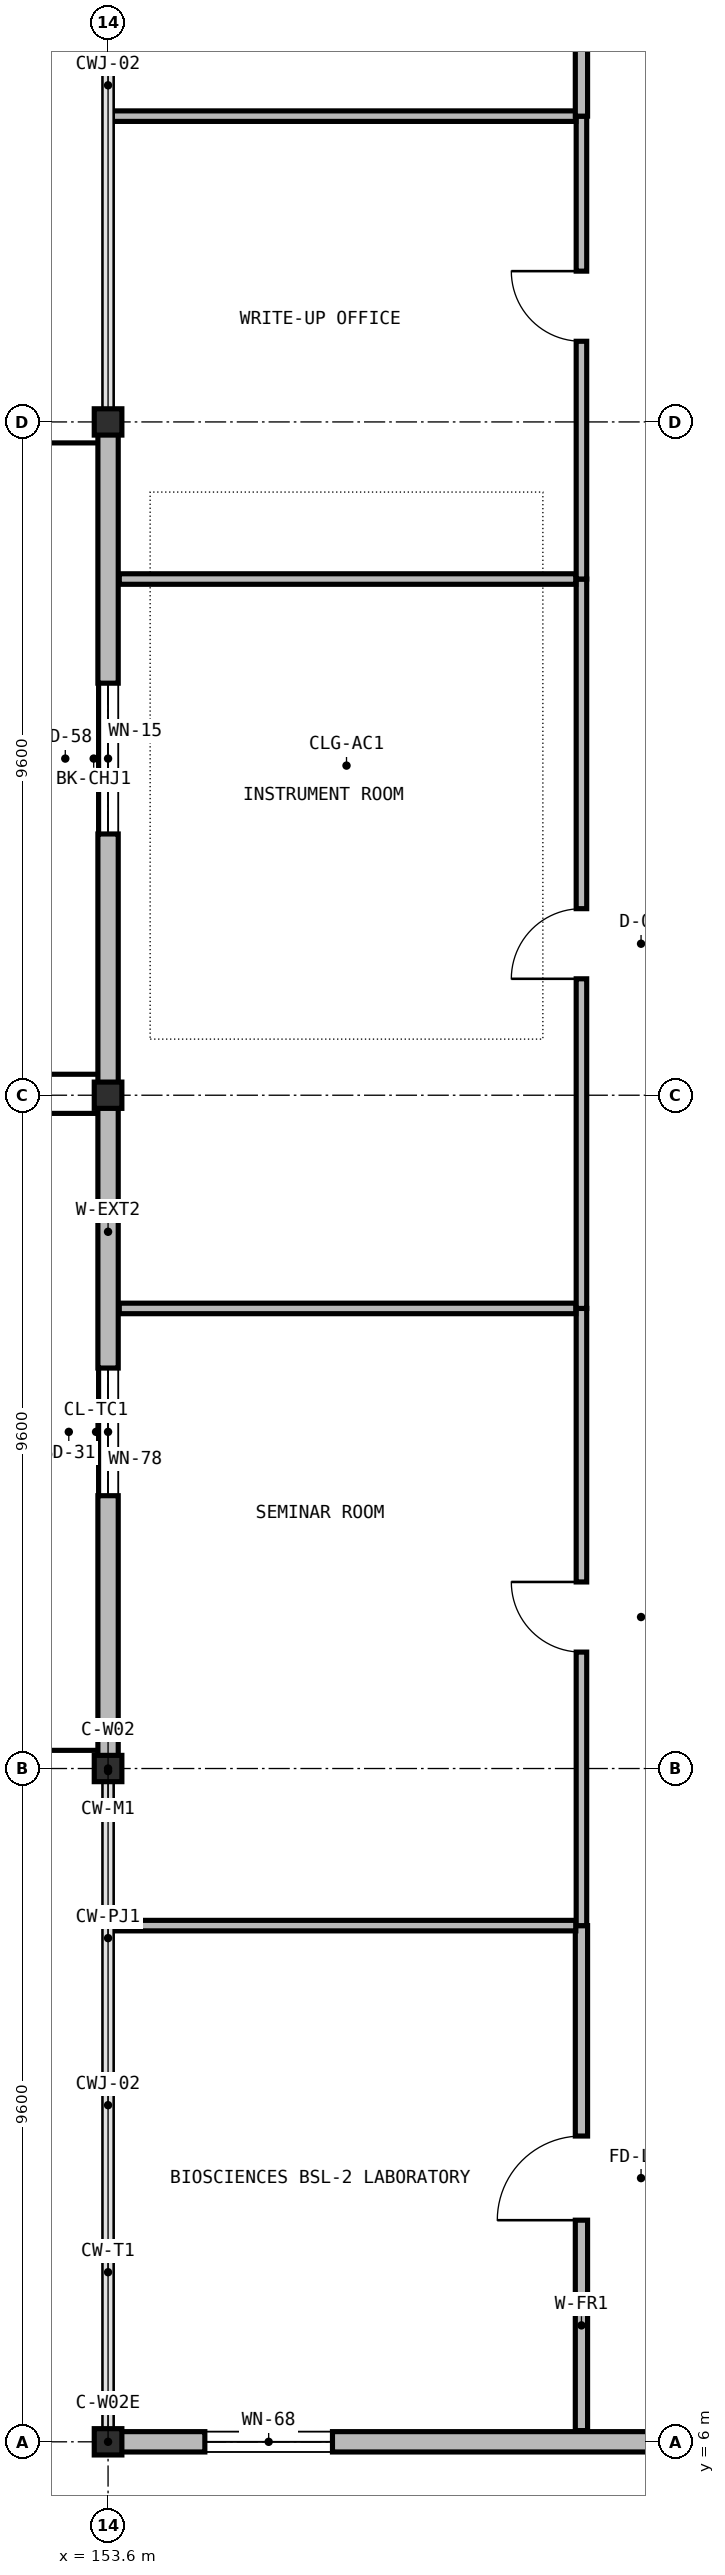
"""IFC4 building model, lengths in metres.
Left out: names, types, materials, properties, quantities, classifications, styles, units other than length and angle.
Written with IfcOpenShell. Run it as: python <this file> out.ifc"""

import sys

from ifc_helpers import new_model, si_unit, direction, frame, frame_2d, origin, origin_2d, place, context, subcontext, project, spatial, rectangle, i_section, extrude, element, fill, save


model = new_model("IFC4")
c1 = context("Model", 3, precision=1e-05, world=origin(), true_north=direction((0.0, 1.0)))
c2 = subcontext(c1, "Body", "Model", "MODEL_VIEW")
j1 = project(units=[si_unit("LENGTHUNIT", "METRE"), si_unit("PLANEANGLEUNIT", "RADIAN")], contexts=[c1])
p1 = place(None, origin())
s1 = spatial("IfcSite", under=j1, at=p1, CompositionType="ELEMENT")
p2 = place(p1, origin())
s2 = spatial("IfcBuilding", under=s1, at=p2, CompositionType="ELEMENT")
p3 = place(p2, frame((0.0, 0.0, 14.35)))
s3 = spatial("IfcBuildingStorey", under=s2, at=p3, CompositionType="ELEMENT", Elevation=14.35)
for number, where, z_axis, x_axis in (
    (1, (153.6, 6.0, 0.0), (0.0, 0.0, 1.0), (1.0, 0.0, 0.0)),
    (2, (153.6, 15.6, 0.0), (0.0, 0.0, 1.0), (1.0, 0.0, 0.0)),
    (3, (153.6, 25.2, 0.0), (0.0, 0.0, 1.0), (1.0, 0.0, 0.0)),
    (4, (153.6, 34.8, 0.0), (0.0, 0.0, 1.0), (1.0, 0.0, 0.0)),
):
    element("IfcColumn", number, at=place(p3, frame(where, z_axis=z_axis, x_axis=x_axis)), inside=s3, PredefinedType="COLUMN", context=c2, shape_type="SweptSolid", body=[
        extrude(i_section(OverallWidth=0.394, OverallDepth=0.375, WebThickness=0.02, FlangeThickness=0.032, at=origin_2d()), origin(), (0.0, 0.0, 1.0), 4.55),
    ])
p4 = place(p3, frame((153.6, 15.604, 0.0), z_axis=(0.0, 0.0, 1.0), x_axis=(0.0, 1.0, 0.0)))
e5 = element("IfcWall", 5, at=p4, inside=s3, PredefinedType="SOLIDWALL", context=c2, shape_type="SweptSolid", body=[
    extrude(rectangle(XDim=9.592, YDim=0.29, at=frame_2d((4.796, 0.0))), origin(), (0.0, 0.0, 1.0), 3.892),
])
p5 = place(p4, frame((3.886, 0.0, 0.95)))
e6 = element("IfcOpeningElement", 6, at=p5, cuts=e5, PredefinedType="OPENING", context=c2, shape_type="SweptSolid", body=[
    extrude(rectangle(XDim=1.82, YDim=1.56, at=frame_2d((0.91, 0.78))), frame((0.0, 0.155, 0.0), z_axis=(0.0, -1.0, 0.0), x_axis=(1.0, 0.0, 0.0)), (0.0, 0.0, 1.0), 0.31),
])
p6 = place(p3, frame((153.6, 25.204, 0.0), z_axis=(0.0, 0.0, 1.0), x_axis=(0.0, 1.0, 0.0)))
e7 = element("IfcWall", 7, at=p6, inside=s3, PredefinedType="SOLIDWALL", context=c2, shape_type="SweptSolid", body=[
    extrude(rectangle(XDim=9.592, YDim=0.29, at=frame_2d((4.796, 0.0))), origin(), (0.0, 0.0, 1.0), 3.892),
])
p7 = place(p6, frame((3.721, 0.0, 0.95)))
e8 = element("IfcOpeningElement", 8, at=p7, cuts=e7, PredefinedType="OPENING", context=c2, shape_type="SweptSolid", body=[
    extrude(rectangle(XDim=2.15, YDim=1.48, at=frame_2d((1.075, 0.74))), frame((0.0, 0.155, 0.0), z_axis=(0.0, -1.0, 0.0), x_axis=(1.0, 0.0, 0.0)), (0.0, 0.0, 1.0), 0.31),
])
p8 = place(p3, frame((163.196, 6.0, 0.0), z_axis=(0.0, 0.0, 1.0), x_axis=(-1.0, 0.0, 0.0)))
e9 = element("IfcWall", 9, at=p8, inside=s3, PredefinedType="SOLIDWALL", context=c2, shape_type="SweptSolid", body=[
    extrude(rectangle(XDim=9.741, YDim=0.29, at=frame_2d((4.871, 0.0))), origin(), (0.0, 0.0, 1.0), 3.884),
])
p9 = place(p8, frame((6.396, 0.0, 0.95)))
e10 = element("IfcOpeningElement", 10, at=p9, cuts=e9, PredefinedType="OPENING", context=c2, shape_type="SweptSolid", body=[
    extrude(rectangle(XDim=1.82, YDim=1.72, at=frame_2d((0.91, 0.86))), frame((0.0, 0.155, 0.0), z_axis=(0.0, -1.0, 0.0), x_axis=(1.0, 0.0, 0.0)), (0.0, 0.0, 1.0), 0.31),
])
p10 = place(p3, frame((160.35, 6.16, 0.0), z_axis=(0.0, 0.0, 1.0), x_axis=(0.0, 1.0, 0.0)))
e11 = element("IfcWall", 11, at=p10, inside=s3, PredefinedType="PARTITIONING", context=c2, shape_type="SweptSolid", body=[
    extrude(rectangle(XDim=7.2, YDim=0.175, at=frame_2d((3.6, 0.0))), origin(), (0.0, 0.0, 1.0), 4.3),
])
p11 = place(p10, frame((3.0, 0.0, 0.0)))
e12 = element("IfcOpeningElement", 12, at=p11, cuts=e11, PredefinedType="OPENING", context=c2, shape_type="SweptSolid", body=[
    extrude(rectangle(XDim=1.2, YDim=2.2, at=frame_2d((0.6, 1.1))), frame((0.0, 0.097, 0.0), z_axis=(0.0, -1.0, 0.0), x_axis=(1.0, 0.0, 0.0)), (0.0, 0.0, 1.0), 0.195),
])
p12 = place(p3, frame((153.66, 13.36, 0.0), z_axis=(0.0, 0.0, 1.0), x_axis=(1.0, 0.0, 0.0)))
e13 = element("IfcWall", 13, at=p12, inside=s3, PredefinedType="PARTITIONING", context=c2, shape_type="SweptSolid", body=[
    extrude(rectangle(XDim=6.61, YDim=0.15, at=frame_2d((3.305, 0.0))), origin(), (0.0, 0.0, 1.0), 4.3),
])
p13 = place(p3, frame((160.35, 13.36, 0.0), z_axis=(0.0, 0.0, 1.0), x_axis=(0.0, 1.0, 0.0)))
e14 = element("IfcWall", 14, at=p13, inside=s3, PredefinedType="PARTITIONING", context=c2, shape_type="SweptSolid", body=[
    extrude(rectangle(XDim=8.8, YDim=0.15, at=frame_2d((4.4, 0.0))), origin(), (0.0, 0.0, 1.0), 4.3),
])
p14 = place(p13, frame((3.9, 0.0, 0.0)))
e15 = element("IfcOpeningElement", 15, at=p14, cuts=e14, PredefinedType="OPENING", context=c2, shape_type="SweptSolid", body=[
    extrude(rectangle(XDim=1.0, YDim=2.2, at=frame_2d((0.5, 1.1))), frame((0.0, 0.085, 0.0), z_axis=(0.0, -1.0, 0.0), x_axis=(1.0, 0.0, 0.0)), (0.0, 0.0, 1.0), 0.17),
])
p15 = place(p3, frame((153.76, 22.16, 0.0), z_axis=(0.0, 0.0, 1.0), x_axis=(1.0, 0.0, 0.0)))
e16 = element("IfcWall", 16, at=p15, inside=s3, PredefinedType="PARTITIONING", context=c2, shape_type="SweptSolid", body=[
    extrude(rectangle(XDim=6.51, YDim=0.15, at=frame_2d((3.255, 0.0))), origin(), (0.0, 0.0, 1.0), 4.3),
])
p16 = place(p3, frame((160.35, 22.16, 0.0), z_axis=(0.0, 0.0, 1.0), x_axis=(0.0, 1.0, 0.0)))
e17 = element("IfcWall", 17, at=p16, inside=s3, PredefinedType="PARTITIONING", context=c2, shape_type="SweptSolid", body=[
    extrude(rectangle(XDim=10.4, YDim=0.15, at=frame_2d((5.2, 0.0))), origin(), (0.0, 0.0, 1.0), 4.3),
])
p17 = place(p16, frame((4.7, 0.0, 0.0)))
e18 = element("IfcOpeningElement", 18, at=p17, cuts=e17, PredefinedType="OPENING", context=c2, shape_type="SweptSolid", body=[
    extrude(rectangle(XDim=1.0, YDim=2.2, at=frame_2d((0.5, 1.1))), frame((0.0, 0.085, 0.0), z_axis=(0.0, -1.0, 0.0), x_axis=(1.0, 0.0, 0.0)), (0.0, 0.0, 1.0), 0.17),
])
p18 = place(p3, frame((153.76, 32.56, 0.0), z_axis=(0.0, 0.0, 1.0), x_axis=(1.0, 0.0, 0.0)))
e19 = element("IfcWall", 19, at=p18, inside=s3, PredefinedType="PARTITIONING", context=c2, shape_type="SweptSolid", body=[
    extrude(rectangle(XDim=6.51, YDim=0.15, at=frame_2d((3.255, 0.0))), origin(), (0.0, 0.0, 1.0), 4.3),
])
p19 = place(p3, frame((160.35, 32.56, 0.0), z_axis=(0.0, 0.0, 1.0), x_axis=(0.0, 1.0, 0.0)))
e20 = element("IfcWall", 20, at=p19, inside=s3, PredefinedType="PARTITIONING", context=c2, shape_type="SweptSolid", body=[
    extrude(rectangle(XDim=6.6, YDim=0.15, at=frame_2d((3.3, 0.0))), origin(), (0.0, 0.0, 1.0), 4.3),
])
p20 = place(p19, frame((3.39, 0.0, 0.0)))
e21 = element("IfcOpeningElement", 21, at=p20, cuts=e20, PredefinedType="OPENING", context=c2, shape_type="SweptSolid", body=[
    extrude(rectangle(XDim=1.0, YDim=2.2, at=frame_2d((0.5, 1.1))), frame((0.0, 0.085, 0.0), z_axis=(0.0, -1.0, 0.0), x_axis=(1.0, 0.0, 0.0)), (0.0, 0.0, 1.0), 0.17),
])
p21 = place(p3, frame((153.66, 39.16, 0.0), z_axis=(0.0, 0.0, 1.0), x_axis=(1.0, 0.0, 0.0)))
e22 = element("IfcWall", 22, at=p21, inside=s3, PredefinedType="PARTITIONING", context=c2, shape_type="SweptSolid", body=[
    extrude(rectangle(XDim=6.61, YDim=0.15, at=frame_2d((3.305, 0.0))), origin(), (0.0, 0.0, 1.0), 4.3),
])
p22 = place(p3, frame((160.35, 39.16, 0.0), z_axis=(0.0, 0.0, 1.0), x_axis=(0.0, 1.0, 0.0)))
e23 = element("IfcWall", 23, at=p22, inside=s3, PredefinedType="PARTITIONING", context=c2, shape_type="SweptSolid", body=[
    extrude(rectangle(XDim=7.2, YDim=0.175, at=frame_2d((3.6, 0.0))), origin(), (0.0, 0.0, 1.0), 4.3),
])
p23 = place(p22, frame((3.0, 0.0, 0.0)))
e24 = element("IfcOpeningElement", 24, at=p23, cuts=e23, PredefinedType="OPENING", context=c2, shape_type="SweptSolid", body=[
    extrude(rectangle(XDim=1.2, YDim=2.2, at=frame_2d((0.6, 1.1))), frame((0.0, 0.097, 0.0), z_axis=(0.0, -1.0, 0.0), x_axis=(1.0, 0.0, 0.0)), (0.0, 0.0, 1.0), 0.195),
])
p24 = place(p5, origin())
e25 = element("IfcWindow", 25, at=p24, inside=s3, PartitioningType="SINGLE_PANEL", PredefinedType="WINDOW", context=c2, shape_type="SweptSolid", body=[
    extrude(rectangle(XDim=1.82, YDim=1.56, at=frame_2d((0.91, 0.78))), frame((0.0, 0.03, 0.0), z_axis=(0.0, -1.0, 0.0), x_axis=(1.0, 0.0, 0.0)), (0.0, 0.0, 1.0), 0.06),
])
fill(e6, e25)
p25 = place(p7, origin())
e26 = element("IfcWindow", 26, at=p25, inside=s3, PartitioningType="SINGLE_PANEL", PredefinedType="WINDOW", context=c2, shape_type="SweptSolid", body=[
    extrude(rectangle(XDim=2.15, YDim=1.48, at=frame_2d((1.075, 0.74))), frame((0.0, 0.03, 0.0), z_axis=(0.0, -1.0, 0.0), x_axis=(1.0, 0.0, 0.0)), (0.0, 0.0, 1.0), 0.06),
])
fill(e8, e26)
p26 = place(p9, origin())
e27 = element("IfcWindow", 27, at=p26, inside=s3, PartitioningType="SINGLE_PANEL", PredefinedType="WINDOW", context=c2, shape_type="SweptSolid", body=[
    extrude(rectangle(XDim=1.82, YDim=1.72, at=frame_2d((0.91, 0.86))), frame((0.0, 0.03, 0.0), z_axis=(0.0, -1.0, 0.0), x_axis=(1.0, 0.0, 0.0)), (0.0, 0.0, 1.0), 0.06),
])
fill(e10, e27)
p27 = place(p11, origin())
e28 = element("IfcDoor", 28, at=p27, inside=s3, OperationType="SINGLE_SWING_LEFT", PredefinedType="DOOR", context=c2, shape_type="SweptSolid", body=[
    extrude(rectangle(XDim=1.2, YDim=2.2, at=frame_2d((0.6, 1.1))), frame((0.0, 0.025, 0.0), z_axis=(0.0, -1.0, 0.0), x_axis=(1.0, 0.0, 0.0)), (0.0, 0.0, 1.0), 0.05),
])
fill(e12, e28)
p28 = place(p14, origin())
e29 = element("IfcDoor", 29, at=p28, inside=s3, OperationType="SINGLE_SWING_RIGHT", PredefinedType="DOOR", context=c2, shape_type="SweptSolid", body=[
    extrude(rectangle(XDim=1.0, YDim=2.2, at=frame_2d((0.5, 1.1))), frame((0.0, 0.025, 0.0), z_axis=(0.0, -1.0, 0.0), x_axis=(1.0, 0.0, 0.0)), (0.0, 0.0, 1.0), 0.05),
])
fill(e15, e29)
p29 = place(p17, origin())
e30 = element("IfcDoor", 30, at=p29, inside=s3, OperationType="SINGLE_SWING_LEFT", PredefinedType="DOOR", context=c2, shape_type="SweptSolid", body=[
    extrude(rectangle(XDim=1.0, YDim=2.2, at=frame_2d((0.5, 1.1))), frame((0.0, 0.025, 0.0), z_axis=(0.0, -1.0, 0.0), x_axis=(1.0, 0.0, 0.0)), (0.0, 0.0, 1.0), 0.05),
])
fill(e18, e30)
p30 = place(p20, origin())
e31 = element("IfcDoor", 31, at=p30, inside=s3, OperationType="SINGLE_SWING_RIGHT", PredefinedType="DOOR", context=c2, shape_type="SweptSolid", body=[
    extrude(rectangle(XDim=1.0, YDim=2.2, at=frame_2d((0.5, 1.1))), frame((0.0, 0.025, 0.0), z_axis=(0.0, -1.0, 0.0), x_axis=(1.0, 0.0, 0.0)), (0.0, 0.0, 1.0), 0.05),
])
fill(e21, e31)
save(model, sys.argv[1])
